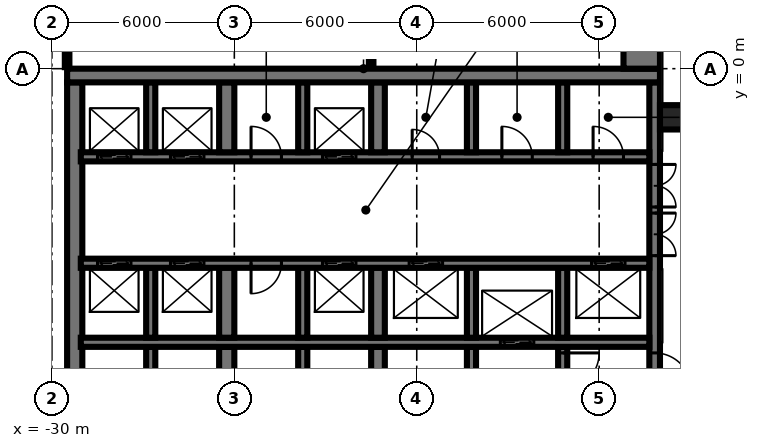
"""IFC4 building model, lengths in metres.
Left out: names, types, materials, properties, quantities, classifications, styles, units other than length and angle.
Written with IfcOpenShell. Run it as: python <this file> out.ifc"""

import sys

from ifc_helpers import new_model, si_unit, direction, frame, frame_2d, origin, origin_2d, place, context, subcontext, project, spatial, rectangle, extrude, element, fill, save


model = new_model("IFC4")
c1 = context("Model", 3, precision=1e-05, world=origin(), true_north=direction((0.0, 1.0)))
c2 = subcontext(c1, "Body", "Model", "MODEL_VIEW")
j1 = project(units=[si_unit("LENGTHUNIT", "METRE"), si_unit("PLANEANGLEUNIT", "RADIAN")], contexts=[c1])
p1 = place(None, origin())
s1 = spatial("IfcSite", under=j1, at=p1, CompositionType="ELEMENT")
p2 = place(p1, origin())
s2 = spatial("IfcBuilding", under=s1, at=p2, CompositionType="ELEMENT")
p3 = place(p2, origin())
s3 = spatial("IfcBuildingStorey", under=s2, at=p3, CompositionType="ELEMENT", Elevation=0.0)
p4 = place(p3, frame((-29.5, -0.225, -0.3), z_axis=(0.0, 0.0, 1.0), x_axis=(1.0, 0.0, 0.0)))
e1 = element("IfcWall", 1, at=p4, inside=s3, PredefinedType="SHEAR", context=c2, shape_type="SweptSolid", body=[
    extrude(rectangle(XDim=19.5, YDim=0.45, at=frame_2d((9.75, 0.0))), origin(), (0.0, 0.0, 1.0), 7.3),
])
p5 = place(p3, frame((-10.175, -14.55, -0.3), z_axis=(0.0, 0.0, 1.0), x_axis=(0.0, 1.0, 0.0)))
e2 = element("IfcWall", 2, at=p5, inside=s3, PredefinedType="SHEAR", context=c2, shape_type="SweptSolid", body=[
    extrude(rectangle(XDim=14.1, YDim=0.35, at=frame_2d((7.05, 0.0))), origin(), (0.0, 0.0, 1.0), 7.3),
])
p6 = place(p5, frame((8.4, 0.0, 0.3)))
e3 = element("IfcOpeningElement", 3, at=p6, cuts=e2, PredefinedType="OPENING", context=c2, shape_type="SweptSolid", body=[
    extrude(rectangle(XDim=1.4, YDim=2.4, at=frame_2d((0.7, 1.2))), frame((0.0, 0.185, 0.0), z_axis=(0.0, -1.0, 0.0), x_axis=(1.0, 0.0, 0.0)), (0.0, 0.0, 1.0), 0.37),
])
p7 = place(p5, frame((10.0, 0.0, 0.3)))
e4 = element("IfcOpeningElement", 4, at=p7, cuts=e2, PredefinedType="OPENING", context=c2, shape_type="SweptSolid", body=[
    extrude(rectangle(XDim=1.4, YDim=2.4, at=frame_2d((0.7, 1.2))), frame((0.0, 0.185, 0.0), z_axis=(0.0, -1.0, 0.0), x_axis=(1.0, 0.0, 0.0)), (0.0, 0.0, 1.0), 0.37),
])
p8 = place(p5, frame((4.0, 0.0, 0.3)))
e5 = element("IfcOpeningElement", 5, at=p8, cuts=e2, PredefinedType="OPENING", context=c2, shape_type="SweptSolid", body=[
    extrude(rectangle(XDim=1.2, YDim=2.1, at=frame_2d((0.6, 1.05))), frame((0.0, 0.185, 0.0), z_axis=(0.0, -1.0, 0.0), x_axis=(1.0, 0.0, 0.0)), (0.0, 0.0, 1.0), 0.37),
])
p9 = place(p3, frame((-29.25, -14.55, -0.3), z_axis=(0.0, 0.0, 1.0), x_axis=(0.0, 1.0, 0.0)))
e6 = element("IfcWall", 6, at=p9, inside=s3, PredefinedType="SHEAR", context=c2, shape_type="SweptSolid", body=[
    extrude(rectangle(XDim=14.1, YDim=0.5, at=frame_2d((7.05, 0.0))), origin(), (0.0, 0.0, 1.0), 7.3),
])
p10 = place(p3, frame((-29.05, -2.9, -0.3), z_axis=(0.0, 0.0, 1.0), x_axis=(1.0, 0.0, 0.0)))
e7 = element("IfcWall", 7, at=p10, inside=s3, PredefinedType="SHEAR", context=c2, shape_type="SweptSolid", body=[
    extrude(rectangle(XDim=18.7, YDim=0.3, at=frame_2d((9.35, 0.0))), origin(), (0.0, 0.0, 1.0), 7.3),
])
p11 = place(p10, frame((2.95, 0.0, 0.3)))
e8 = element("IfcOpeningElement", 8, at=p11, cuts=e7, PredefinedType="OPENING", context=c2, shape_type="SweptSolid", body=[
    extrude(rectangle(XDim=1.1, YDim=2.1, at=frame_2d((0.55, 1.05))), frame((0.0, 0.16, 0.0), z_axis=(0.0, -1.0, 0.0), x_axis=(1.0, 0.0, 0.0)), (0.0, 0.0, 1.0), 0.32),
])
p12 = place(p10, frame((0.55, 0.0, 0.3)))
e9 = element("IfcOpeningElement", 9, at=p12, cuts=e7, PredefinedType="OPENING", context=c2, shape_type="SweptSolid", body=[
    extrude(rectangle(XDim=1.1, YDim=2.1, at=frame_2d((0.55, 1.05))), frame((0.0, 0.16, 0.0), z_axis=(0.0, -1.0, 0.0), x_axis=(1.0, 0.0, 0.0)), (0.0, 0.0, 1.0), 0.32),
])
p13 = place(p10, frame((7.95, 0.0, 0.3)))
e10 = element("IfcOpeningElement", 10, at=p13, cuts=e7, PredefinedType="OPENING", context=c2, shape_type="SweptSolid", body=[
    extrude(rectangle(XDim=1.1, YDim=2.1, at=frame_2d((0.55, 1.05))), frame((0.0, 0.16, 0.0), z_axis=(0.0, -1.0, 0.0), x_axis=(1.0, 0.0, 0.0)), (0.0, 0.0, 1.0), 0.32),
])
p14 = place(p10, frame((10.9, 0.0, 0.3)))
e11 = element("IfcOpeningElement", 11, at=p14, cuts=e7, PredefinedType="OPENING", context=c2, shape_type="SweptSolid", body=[
    extrude(rectangle(XDim=0.9, YDim=2.1, at=frame_2d((0.45, 1.05))), frame((0.0, 0.16, 0.0), z_axis=(0.0, -1.0, 0.0), x_axis=(1.0, 0.0, 0.0)), (0.0, 0.0, 1.0), 0.32),
])
p15 = place(p10, frame((16.85, 0.0, 0.3)))
e12 = element("IfcOpeningElement", 12, at=p15, cuts=e7, PredefinedType="OPENING", context=c2, shape_type="SweptSolid", body=[
    extrude(rectangle(XDim=1.0, YDim=2.1, at=frame_2d((0.5, 1.05))), frame((0.0, 0.16, 0.0), z_axis=(0.0, -1.0, 0.0), x_axis=(1.0, 0.0, 0.0)), (0.0, 0.0, 1.0), 0.32),
])
p16 = place(p10, frame((13.85, 0.0, 0.3)))
e13 = element("IfcOpeningElement", 13, at=p16, cuts=e7, PredefinedType="OPENING", context=c2, shape_type="SweptSolid", body=[
    extrude(rectangle(XDim=1.0, YDim=2.1, at=frame_2d((0.5, 1.05))), frame((0.0, 0.16, 0.0), z_axis=(0.0, -1.0, 0.0), x_axis=(1.0, 0.0, 0.0)), (0.0, 0.0, 1.0), 0.32),
])
p17 = place(p10, frame((5.6, 0.0, 0.3)))
e14 = element("IfcOpeningElement", 14, at=p17, cuts=e7, PredefinedType="OPENING", context=c2, shape_type="SweptSolid", body=[
    extrude(rectangle(XDim=1.0, YDim=2.1, at=frame_2d((0.5, 1.05))), frame((0.0, 0.16, 0.0), z_axis=(0.0, -1.0, 0.0), x_axis=(1.0, 0.0, 0.0)), (0.0, 0.0, 1.0), 0.32),
])
p18 = place(p3, frame((-29.05, -6.4, -0.3), z_axis=(0.0, 0.0, 1.0), x_axis=(1.0, 0.0, 0.0)))
e15 = element("IfcWall", 15, at=p18, inside=s3, PredefinedType="SHEAR", context=c2, shape_type="SweptSolid", body=[
    extrude(rectangle(XDim=18.7, YDim=0.3, at=frame_2d((9.35, 0.0))), origin(), (0.0, 0.0, 1.0), 7.3),
])
p19 = place(p18, frame((2.95, 0.0, 0.3)))
e16 = element("IfcOpeningElement", 16, at=p19, cuts=e15, PredefinedType="OPENING", context=c2, shape_type="SweptSolid", body=[
    extrude(rectangle(XDim=1.1, YDim=2.1, at=frame_2d((0.55, 1.05))), frame((0.0, 0.16, 0.0), z_axis=(0.0, -1.0, 0.0), x_axis=(1.0, 0.0, 0.0)), (0.0, 0.0, 1.0), 0.32),
])
p20 = place(p18, frame((0.55, 0.0, 0.3)))
e17 = element("IfcOpeningElement", 17, at=p20, cuts=e15, PredefinedType="OPENING", context=c2, shape_type="SweptSolid", body=[
    extrude(rectangle(XDim=1.1, YDim=2.1, at=frame_2d((0.55, 1.05))), frame((0.0, 0.16, 0.0), z_axis=(0.0, -1.0, 0.0), x_axis=(1.0, 0.0, 0.0)), (0.0, 0.0, 1.0), 0.32),
])
p21 = place(p18, frame((7.95, 0.0, 0.3)))
e18 = element("IfcOpeningElement", 18, at=p21, cuts=e15, PredefinedType="OPENING", context=c2, shape_type="SweptSolid", body=[
    extrude(rectangle(XDim=1.1, YDim=2.1, at=frame_2d((0.55, 1.05))), frame((0.0, 0.16, 0.0), z_axis=(0.0, -1.0, 0.0), x_axis=(1.0, 0.0, 0.0)), (0.0, 0.0, 1.0), 0.32),
])
p22 = place(p18, frame((16.8, 0.0, 0.3)))
e19 = element("IfcOpeningElement", 19, at=p22, cuts=e15, PredefinedType="OPENING", context=c2, shape_type="SweptSolid", body=[
    extrude(rectangle(XDim=1.1, YDim=2.1, at=frame_2d((0.55, 1.05))), frame((0.0, 0.16, 0.0), z_axis=(0.0, -1.0, 0.0), x_axis=(1.0, 0.0, 0.0)), (0.0, 0.0, 1.0), 0.32),
])
p23 = place(p18, frame((10.8, 0.0, 0.3)))
e20 = element("IfcOpeningElement", 20, at=p23, cuts=e15, PredefinedType="OPENING", context=c2, shape_type="SweptSolid", body=[
    extrude(rectangle(XDim=1.1, YDim=2.1, at=frame_2d((0.55, 1.05))), frame((0.0, 0.16, 0.0), z_axis=(0.0, -1.0, 0.0), x_axis=(1.0, 0.0, 0.0)), (0.0, 0.0, 1.0), 0.32),
])
p24 = place(p18, frame((5.6, 0.0, 0.3)))
e21 = element("IfcOpeningElement", 21, at=p24, cuts=e15, PredefinedType="OPENING", context=c2, shape_type="SweptSolid", body=[
    extrude(rectangle(XDim=1.0, YDim=2.1, at=frame_2d((0.5, 1.05))), frame((0.0, 0.16, 0.0), z_axis=(0.0, -1.0, 0.0), x_axis=(1.0, 0.0, 0.0)), (0.0, 0.0, 1.0), 0.32),
])
p25 = place(p3, frame((-29.05, -9.0, -0.3), z_axis=(0.0, 0.0, 1.0), x_axis=(1.0, 0.0, 0.0)))
e22 = element("IfcWall", 22, at=p25, inside=s3, PredefinedType="SHEAR", context=c2, shape_type="SweptSolid", body=[
    extrude(rectangle(XDim=18.7, YDim=0.3, at=frame_2d((9.35, 0.0))), origin(), (0.0, 0.0, 1.0), 7.3),
])
p26 = place(p25, frame((13.8, 0.0, 0.3)))
e23 = element("IfcOpeningElement", 23, at=p26, cuts=e22, PredefinedType="OPENING", context=c2, shape_type="SweptSolid", body=[
    extrude(rectangle(XDim=1.1, YDim=2.1, at=frame_2d((0.55, 1.05))), frame((0.0, 0.16, 0.0), z_axis=(0.0, -1.0, 0.0), x_axis=(1.0, 0.0, 0.0)), (0.0, 0.0, 1.0), 0.32),
])
for number, where, z_axis, x_axis in (
    (24, (-13.2, -2.75, -0.3), (0.0, 0.0, 1.0), (0.0, 1.0, 0.0)),
    (25, (-13.2, -8.85, -0.3), (0.0, 0.0, 1.0), (0.0, 1.0, 0.0)),
):
    element("IfcWall", number, at=place(p3, frame(where, z_axis=z_axis, x_axis=x_axis)), inside=s3, PredefinedType="SHEAR", context=c2, shape_type="SweptSolid", body=[
        extrude(rectangle(XDim=2.3, YDim=0.3, at=frame_2d((1.15, 0.0))), origin(), (0.0, 0.0, 1.0), 7.3),
    ])
p27 = place(p3, frame((-13.2, -14.55, -0.3), z_axis=(0.0, 0.0, 1.0), x_axis=(0.0, 1.0, 0.0)))
e26 = element("IfcWall", 26, at=p27, inside=s3, PredefinedType="SHEAR", context=c2, shape_type="SweptSolid", body=[
    extrude(rectangle(XDim=5.4, YDim=0.3, at=frame_2d((2.7, 0.0))), origin(), (0.0, 0.0, 1.0), 7.3),
])
p28 = place(p27, frame((4.0, 0.0, 0.3)))
e27 = element("IfcOpeningElement", 27, at=p28, cuts=e26, PredefinedType="OPENING", context=c2, shape_type="SweptSolid", body=[
    extrude(rectangle(XDim=1.2, YDim=2.1, at=frame_2d((0.6, 1.05))), frame((0.0, 0.16, 0.0), z_axis=(0.0, -1.0, 0.0), x_axis=(1.0, 0.0, 0.0)), (0.0, 0.0, 1.0), 0.32),
])
for number, where, z_axis, x_axis in (
    (28, (-16.2, -2.75, -0.3), (0.0, 0.0, 1.0), (0.0, 1.0, 0.0)),
    (29, (-16.2, -8.85, -0.3), (0.0, 0.0, 1.0), (0.0, 1.0, 0.0)),
):
    element("IfcWall", number, at=place(p3, frame(where, z_axis=z_axis, x_axis=x_axis)), inside=s3, PredefinedType="SHEAR", context=c2, shape_type="SweptSolid", body=[
        extrude(rectangle(XDim=2.3, YDim=0.3, at=frame_2d((1.15, 0.0))), origin(), (0.0, 0.0, 1.0), 7.3),
    ])
p29 = place(p3, frame((-16.2, -14.55, -0.3), z_axis=(0.0, 0.0, 1.0), x_axis=(0.0, 1.0, 0.0)))
e30 = element("IfcWall", 30, at=p29, inside=s3, PredefinedType="SHEAR", context=c2, shape_type="SweptSolid", body=[
    extrude(rectangle(XDim=5.4, YDim=0.3, at=frame_2d((2.7, 0.0))), origin(), (0.0, 0.0, 1.0), 7.3),
])
p30 = place(p29, frame((0.2, 0.0, 0.3)))
e31 = element("IfcOpeningElement", 31, at=p30, cuts=e30, PredefinedType="OPENING", context=c2, shape_type="SweptSolid", body=[
    extrude(rectangle(XDim=1.2, YDim=2.1, at=frame_2d((0.6, 1.05))), frame((0.0, 0.16, 0.0), z_axis=(0.0, -1.0, 0.0), x_axis=(1.0, 0.0, 0.0)), (0.0, 0.0, 1.0), 0.32),
])
for number, where, z_axis, x_axis in (
    (32, (-19.275, -2.75, -0.3), (0.0, 0.0, 1.0), (0.0, 1.0, 0.0)),
    (33, (-19.275, -8.85, -0.3), (0.0, 0.0, 1.0), (0.0, 1.0, 0.0)),
):
    element("IfcWall", number, at=place(p3, frame(where, z_axis=z_axis, x_axis=x_axis)), inside=s3, PredefinedType="SHEAR", context=c2, shape_type="SweptSolid", body=[
        extrude(rectangle(XDim=2.3, YDim=0.45, at=frame_2d((1.15, 0.0))), origin(), (0.0, 0.0, 1.0), 7.3),
    ])
p31 = place(p3, frame((-19.275, -14.55, -0.3), z_axis=(0.0, 0.0, 1.0), x_axis=(0.0, 1.0, 0.0)))
e34 = element("IfcWall", 34, at=p31, inside=s3, PredefinedType="SHEAR", context=c2, shape_type="SweptSolid", body=[
    extrude(rectangle(XDim=5.4, YDim=0.45, at=frame_2d((2.7, 0.0))), origin(), (0.0, 0.0, 1.0), 7.3),
])
for number, where, z_axis, x_axis in (
    (35, (-21.75, -2.75, -0.3), (0.0, 0.0, 1.0), (0.0, 1.0, 0.0)),
    (36, (-21.75, -8.85, -0.3), (0.0, 0.0, 1.0), (0.0, 1.0, 0.0)),
):
    element("IfcWall", number, at=place(p3, frame(where, z_axis=z_axis, x_axis=x_axis)), inside=s3, PredefinedType="SHEAR", context=c2, shape_type="SweptSolid", body=[
        extrude(rectangle(XDim=2.3, YDim=0.3, at=frame_2d((1.15, 0.0))), origin(), (0.0, 0.0, 1.0), 7.3),
    ])
p32 = place(p3, frame((-21.75, -14.55, -0.3), z_axis=(0.0, 0.0, 1.0), x_axis=(0.0, 1.0, 0.0)))
e37 = element("IfcWall", 37, at=p32, inside=s3, PredefinedType="SHEAR", context=c2, shape_type="SweptSolid", body=[
    extrude(rectangle(XDim=5.4, YDim=0.3, at=frame_2d((2.7, 0.0))), origin(), (0.0, 0.0, 1.0), 7.3),
])
for number, where, z_axis, x_axis in (
    (38, (-24.25, -2.75, -0.3), (0.0, 0.0, 1.0), (0.0, 1.0, 0.0)),
    (39, (-24.25, -8.85, -0.3), (0.0, 0.0, 1.0), (0.0, 1.0, 0.0)),
):
    element("IfcWall", number, at=place(p3, frame(where, z_axis=z_axis, x_axis=x_axis)), inside=s3, PredefinedType="SHEAR", context=c2, shape_type="SweptSolid", body=[
        extrude(rectangle(XDim=2.3, YDim=0.5, at=frame_2d((1.15, 0.0))), origin(), (0.0, 0.0, 1.0), 7.3),
    ])
p33 = place(p3, frame((-24.25, -14.55, -0.3), z_axis=(0.0, 0.0, 1.0), x_axis=(0.0, 1.0, 0.0)))
e40 = element("IfcWall", 40, at=p33, inside=s3, PredefinedType="SHEAR", context=c2, shape_type="SweptSolid", body=[
    extrude(rectangle(XDim=5.4, YDim=0.5, at=frame_2d((2.7, 0.0))), origin(), (0.0, 0.0, 1.0), 7.3),
])
for number, where, z_axis, x_axis in (
    (41, (-26.75, -2.75, -0.3), (0.0, 0.0, 1.0), (0.0, 1.0, 0.0)),
    (42, (-26.75, -8.85, -0.3), (0.0, 0.0, 1.0), (0.0, 1.0, 0.0)),
):
    element("IfcWall", number, at=place(p3, frame(where, z_axis=z_axis, x_axis=x_axis)), inside=s3, PredefinedType="SHEAR", context=c2, shape_type="SweptSolid", body=[
        extrude(rectangle(XDim=2.3, YDim=0.3, at=frame_2d((1.15, 0.0))), origin(), (0.0, 0.0, 1.0), 7.3),
    ])
p34 = place(p3, frame((-26.75, -14.55, -0.3), z_axis=(0.0, 0.0, 1.0), x_axis=(0.0, 1.0, 0.0)))
e43 = element("IfcWall", 43, at=p34, inside=s3, PredefinedType="SHEAR", context=c2, shape_type="SweptSolid", body=[
    extrude(rectangle(XDim=5.4, YDim=0.3, at=frame_2d((2.7, 0.0))), origin(), (0.0, 0.0, 1.0), 7.3),
])
p35 = place(p3, frame((-10.6, 0.0, -0.3), z_axis=(0.0, 0.0, 1.0), x_axis=(0.0, 1.0, 0.0)))
e44 = element("IfcWall", 44, at=p35, inside=s3, PredefinedType="SHEAR", context=c2, shape_type="SweptSolid", body=[
    extrude(rectangle(XDim=8.0, YDim=1.2, at=frame_2d((4.0, 0.0))), origin(), (0.0, 0.0, 1.0), 7.3),
])
p36 = place(p3, frame((-9.6, -1.6, -0.3), z_axis=(0.0, 0.0, 1.0), x_axis=(1.0, 0.0, 0.0)))
e45 = element("IfcColumn", 45, at=p36, inside=s3, PredefinedType="COLUMN", context=c2, shape_type="SweptSolid", body=[
    extrude(rectangle(XDim=0.8, YDim=0.8, at=origin_2d()), origin(), (0.0, 0.0, 1.0), 7.3),
])
p37 = place(p3, frame((-19.5, 0.05, 0.0), z_axis=(0.0, 0.0, 1.0), x_axis=(0.0, 1.0, 0.0)))
e46 = element("IfcWall", 46, at=p37, inside=s3, PredefinedType="PARTITIONING", context=c2, shape_type="SweptSolid", body=[
    extrude(rectangle(XDim=7.77, YDim=0.15, at=frame_2d((3.885, 0.0))), origin(), (0.0, 0.0, 1.0), 6.55),
])
p38 = place(p37, frame((3.5, 0.0, 0.0)))
e47 = element("IfcOpeningElement", 47, at=p38, cuts=e46, PredefinedType="OPENING", context=c2, shape_type="SweptSolid", body=[
    extrude(rectangle(XDim=0.9, YDim=2.1, at=frame_2d((0.45, 1.05))), frame((0.0, 0.085, 0.0), z_axis=(0.0, -1.0, 0.0), x_axis=(1.0, 0.0, 0.0)), (0.0, 0.0, 1.0), 0.17),
])
p39 = place(p3, frame((-29.5, 0.05, 0.0), z_axis=(0.0, 0.0, 1.0), x_axis=(0.0, 1.0, 0.0)))
e48 = element("IfcWall", 48, at=p39, inside=s3, PredefinedType="PARTITIONING", context=c2, shape_type="SweptSolid", body=[
    extrude(rectangle(XDim=7.77, YDim=0.15, at=frame_2d((3.885, 0.0))), origin(), (0.0, 0.0, 1.0), 6.55),
])
p40 = place(p39, frame((3.5, 0.0, 0.0)))
e49 = element("IfcOpeningElement", 49, at=p40, cuts=e48, PredefinedType="OPENING", context=c2, shape_type="SweptSolid", body=[
    extrude(rectangle(XDim=0.9, YDim=2.1, at=frame_2d((0.45, 1.05))), frame((0.0, 0.085, 0.0), z_axis=(0.0, -1.0, 0.0), x_axis=(1.0, 0.0, 0.0)), (0.0, 0.0, 1.0), 0.17),
])
p41 = place(p11, origin())
e50 = element("IfcDoor", 50, at=p41, inside=s3, OperationType="DOUBLE_DOOR_SLIDING", PredefinedType="USERDEFINED", context=c2, shape_type="SweptSolid", body=[
    extrude(rectangle(XDim=1.1, YDim=2.1, at=frame_2d((0.55, 1.05))), frame((0.0, 0.025, 0.0), z_axis=(0.0, -1.0, 0.0), x_axis=(1.0, 0.0, 0.0)), (0.0, 0.0, 1.0), 0.05),
])
fill(e8, e50)
p42 = place(p12, origin())
e51 = element("IfcDoor", 51, at=p42, inside=s3, OperationType="DOUBLE_DOOR_SLIDING", PredefinedType="USERDEFINED", context=c2, shape_type="SweptSolid", body=[
    extrude(rectangle(XDim=1.1, YDim=2.1, at=frame_2d((0.55, 1.05))), frame((0.0, 0.025, 0.0), z_axis=(0.0, -1.0, 0.0), x_axis=(1.0, 0.0, 0.0)), (0.0, 0.0, 1.0), 0.05),
])
fill(e9, e51)
p43 = place(p19, origin())
e52 = element("IfcDoor", 52, at=p43, inside=s3, OperationType="DOUBLE_DOOR_SLIDING", PredefinedType="USERDEFINED", context=c2, shape_type="SweptSolid", body=[
    extrude(rectangle(XDim=1.1, YDim=2.1, at=frame_2d((0.55, 1.05))), frame((0.0, 0.025, 0.0), z_axis=(0.0, -1.0, 0.0), x_axis=(1.0, 0.0, 0.0)), (0.0, 0.0, 1.0), 0.05),
])
fill(e16, e52)
p44 = place(p20, origin())
e53 = element("IfcDoor", 53, at=p44, inside=s3, OperationType="DOUBLE_DOOR_SLIDING", PredefinedType="USERDEFINED", context=c2, shape_type="SweptSolid", body=[
    extrude(rectangle(XDim=1.1, YDim=2.1, at=frame_2d((0.55, 1.05))), frame((0.0, 0.025, 0.0), z_axis=(0.0, -1.0, 0.0), x_axis=(1.0, 0.0, 0.0)), (0.0, 0.0, 1.0), 0.05),
])
fill(e17, e53)
p45 = place(p13, origin())
e54 = element("IfcDoor", 54, at=p45, inside=s3, OperationType="DOUBLE_DOOR_SLIDING", PredefinedType="USERDEFINED", context=c2, shape_type="SweptSolid", body=[
    extrude(rectangle(XDim=1.1, YDim=2.1, at=frame_2d((0.55, 1.05))), frame((0.0, 0.025, 0.0), z_axis=(0.0, -1.0, 0.0), x_axis=(1.0, 0.0, 0.0)), (0.0, 0.0, 1.0), 0.05),
])
fill(e10, e54)
p46 = place(p21, origin())
e55 = element("IfcDoor", 55, at=p46, inside=s3, OperationType="DOUBLE_DOOR_SLIDING", PredefinedType="USERDEFINED", context=c2, shape_type="SweptSolid", body=[
    extrude(rectangle(XDim=1.1, YDim=2.1, at=frame_2d((0.55, 1.05))), frame((0.0, 0.025, 0.0), z_axis=(0.0, -1.0, 0.0), x_axis=(1.0, 0.0, 0.0)), (0.0, 0.0, 1.0), 0.05),
])
fill(e18, e55)
p47 = place(p22, origin())
e56 = element("IfcDoor", 56, at=p47, inside=s3, OperationType="DOUBLE_DOOR_SLIDING", PredefinedType="USERDEFINED", context=c2, shape_type="SweptSolid", body=[
    extrude(rectangle(XDim=1.1, YDim=2.1, at=frame_2d((0.55, 1.05))), frame((0.0, 0.025, 0.0), z_axis=(0.0, -1.0, 0.0), x_axis=(1.0, 0.0, 0.0)), (0.0, 0.0, 1.0), 0.05),
])
fill(e19, e56)
p48 = place(p26, origin())
e57 = element("IfcDoor", 57, at=p48, inside=s3, OperationType="DOUBLE_DOOR_SLIDING", PredefinedType="USERDEFINED", context=c2, shape_type="SweptSolid", body=[
    extrude(rectangle(XDim=1.1, YDim=2.1, at=frame_2d((0.55, 1.05))), frame((0.0, 0.025, 0.0), z_axis=(0.0, -1.0, 0.0), x_axis=(1.0, 0.0, 0.0)), (0.0, 0.0, 1.0), 0.05),
])
fill(e23, e57)
p49 = place(p23, origin())
e58 = element("IfcDoor", 58, at=p49, inside=s3, OperationType="DOUBLE_DOOR_SLIDING", PredefinedType="USERDEFINED", context=c2, shape_type="SweptSolid", body=[
    extrude(rectangle(XDim=1.1, YDim=2.1, at=frame_2d((0.55, 1.05))), frame((0.0, 0.025, 0.0), z_axis=(0.0, -1.0, 0.0), x_axis=(1.0, 0.0, 0.0)), (0.0, 0.0, 1.0), 0.05),
])
fill(e20, e58)
p50 = place(p6, frame((0.7, 0.0, 0.0), z_axis=(0.0, 0.0, 1.0), x_axis=(-1.0, 0.0, 0.0)))
e59 = element("IfcDoor", 59, at=p50, inside=s3, OperationType="DOUBLE_DOOR_SINGLE_SWING", PredefinedType="DOOR", context=c2, shape_type="SweptSolid", body=[
    extrude(rectangle(XDim=1.4, YDim=2.4, at=frame_2d((0.0, 1.2))), frame((0.0, -0.025, 0.0), z_axis=(0.0, 1.0, 0.0), x_axis=(-1.0, 0.0, 0.0)), (0.0, 0.0, 1.0), 0.05),
])
fill(e3, e59)
p51 = place(p7, frame((0.7, 0.0, 0.0), z_axis=(0.0, 0.0, 1.0), x_axis=(-1.0, 0.0, 0.0)))
e60 = element("IfcDoor", 60, at=p51, inside=s3, OperationType="DOUBLE_DOOR_SINGLE_SWING", PredefinedType="DOOR", context=c2, shape_type="SweptSolid", body=[
    extrude(rectangle(XDim=1.4, YDim=2.4, at=frame_2d((0.0, 1.2))), frame((0.0, -0.025, 0.0), z_axis=(0.0, 1.0, 0.0), x_axis=(-1.0, 0.0, 0.0)), (0.0, 0.0, 1.0), 0.05),
])
fill(e4, e60)
p52 = place(p8, frame((0.6, 0.0, 0.0), z_axis=(0.0, 0.0, 1.0), x_axis=(-1.0, 0.0, 0.0)))
e61 = element("IfcDoor", 61, at=p52, inside=s3, OperationType="SINGLE_SWING_LEFT", PredefinedType="DOOR", context=c2, shape_type="SweptSolid", body=[
    extrude(rectangle(XDim=1.2, YDim=2.1, at=frame_2d((0.0, 1.05))), frame((0.0, -0.025, 0.0), z_axis=(0.0, 1.0, 0.0), x_axis=(-1.0, 0.0, 0.0)), (0.0, 0.0, 1.0), 0.05),
])
fill(e5, e61)
p53 = place(p14, origin())
e62 = element("IfcDoor", 62, at=p53, inside=s3, OperationType="SINGLE_SWING_RIGHT", PredefinedType="DOOR", context=c2, shape_type="SweptSolid", body=[
    extrude(rectangle(XDim=0.9, YDim=2.1, at=frame_2d((0.45, 1.05))), frame((0.0, 0.025, 0.0), z_axis=(0.0, -1.0, 0.0), x_axis=(1.0, 0.0, 0.0)), (0.0, 0.0, 1.0), 0.05),
])
fill(e11, e62)
p54 = place(p15, origin())
e63 = element("IfcDoor", 63, at=p54, inside=s3, OperationType="SINGLE_SWING_RIGHT", PredefinedType="DOOR", context=c2, shape_type="SweptSolid", body=[
    extrude(rectangle(XDim=1.0, YDim=2.1, at=frame_2d((0.5, 1.05))), frame((0.0, 0.025, 0.0), z_axis=(0.0, -1.0, 0.0), x_axis=(1.0, 0.0, 0.0)), (0.0, 0.0, 1.0), 0.05),
])
fill(e12, e63)
p55 = place(p16, origin())
e64 = element("IfcDoor", 64, at=p55, inside=s3, OperationType="SINGLE_SWING_RIGHT", PredefinedType="DOOR", context=c2, shape_type="SweptSolid", body=[
    extrude(rectangle(XDim=1.0, YDim=2.1, at=frame_2d((0.5, 1.05))), frame((0.0, 0.025, 0.0), z_axis=(0.0, -1.0, 0.0), x_axis=(1.0, 0.0, 0.0)), (0.0, 0.0, 1.0), 0.05),
])
fill(e13, e64)
p56 = place(p17, origin())
e65 = element("IfcDoor", 65, at=p56, inside=s3, OperationType="SINGLE_SWING_RIGHT", PredefinedType="DOOR", context=c2, shape_type="SweptSolid", body=[
    extrude(rectangle(XDim=1.0, YDim=2.1, at=frame_2d((0.5, 1.05))), frame((0.0, 0.025, 0.0), z_axis=(0.0, -1.0, 0.0), x_axis=(1.0, 0.0, 0.0)), (0.0, 0.0, 1.0), 0.05),
])
fill(e14, e65)
p57 = place(p24, frame((0.5, 0.0, 0.0), z_axis=(0.0, 0.0, 1.0), x_axis=(-1.0, 0.0, 0.0)))
e66 = element("IfcDoor", 66, at=p57, inside=s3, OperationType="SINGLE_SWING_LEFT", PredefinedType="DOOR", context=c2, shape_type="SweptSolid", body=[
    extrude(rectangle(XDim=1.0, YDim=2.1, at=frame_2d((0.0, 1.05))), frame((0.0, -0.025, 0.0), z_axis=(0.0, 1.0, 0.0), x_axis=(-1.0, 0.0, 0.0)), (0.0, 0.0, 1.0), 0.05),
])
fill(e21, e66)
p58 = place(p28, frame((0.6, 0.0, 0.0), z_axis=(0.0, 0.0, 1.0), x_axis=(-1.0, 0.0, 0.0)))
e67 = element("IfcDoor", 67, at=p58, inside=s3, OperationType="SINGLE_SWING_RIGHT", PredefinedType="DOOR", context=c2, shape_type="SweptSolid", body=[
    extrude(rectangle(XDim=1.2, YDim=2.1, at=frame_2d((0.0, 1.05))), frame((0.0, -0.025, 0.0), z_axis=(0.0, 1.0, 0.0), x_axis=(-1.0, 0.0, 0.0)), (0.0, 0.0, 1.0), 0.05),
])
fill(e27, e67)
save(model, sys.argv[1])
